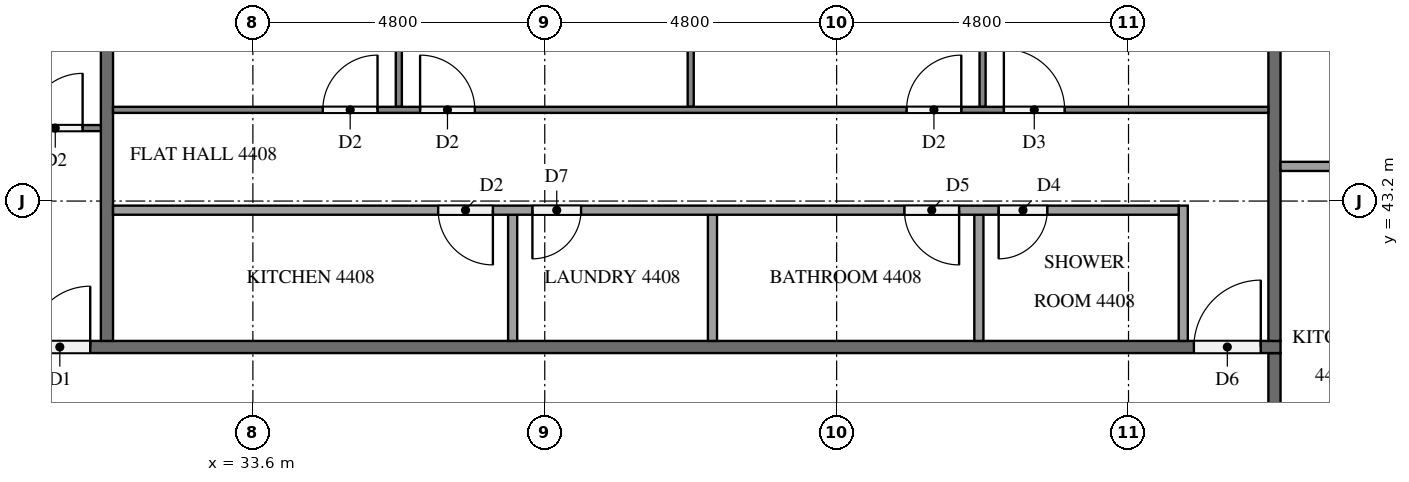
"""IFC4 building model, lengths in metres.
Left out: names, types, materials, properties, quantities, classifications, styles, units other than length and angle.
Written with IfcOpenShell. Run it as: python <this file> out.ifc"""

import sys

from ifc_helpers import new_model, si_unit, direction, frame, frame_2d, origin, place, context, subcontext, project, spatial, rectangle, extrude, element, fill, save


model = new_model("IFC4")
c1 = context("Model", 3, precision=1e-05, world=origin(), true_north=direction((0.0, 1.0)))
c2 = subcontext(c1, "Body", "Model", "MODEL_VIEW")
j1 = project(units=[si_unit("LENGTHUNIT", "METRE"), si_unit("PLANEANGLEUNIT", "RADIAN")], contexts=[c1])
p1 = place(None, origin())
s1 = spatial("IfcSite", under=j1, at=p1, CompositionType="ELEMENT")
p2 = place(p1, origin())
s2 = spatial("IfcBuilding", under=s1, at=p2, CompositionType="ELEMENT")
p3 = place(p2, frame((0.0, 0.0, 170.0)))
s3 = spatial("IfcBuildingStorey", under=s2, at=p3, CompositionType="ELEMENT", Elevation=170.0)
p4 = place(p3, frame((50.4, 40.7, 0.0), z_axis=(0.0, 0.0, 1.0), x_axis=(0.0, -1.0, 0.0)))
e1 = element("IfcWall", 1, at=p4, inside=s3, PredefinedType="PARTITIONING", context=c2, shape_type="SweptSolid", body=[
    extrude(rectangle(XDim=28.6, YDim=0.2, at=frame_2d((14.3, 0.0))), origin(), (0.0, 0.0, 1.0), 3.1),
])
p5 = place(p4, frame((26.575, 0.0, 0.0)))
e2 = element("IfcOpeningElement", 2, at=p5, cuts=e1, PredefinedType="OPENING", context=c2, shape_type="SweptSolid", body=[
    extrude(rectangle(XDim=1.0, YDim=2.1, at=frame_2d((0.5, 1.05))), frame((0.0, 0.11, 0.0), z_axis=(0.0, -1.0, 0.0), x_axis=(1.0, 0.0, 0.0)), (0.0, 0.0, 1.0), 0.22),
])
p6 = place(p4, frame((25.025, 0.0, 0.0)))
e3 = element("IfcOpeningElement", 3, at=p6, cuts=e1, PredefinedType="OPENING", context=c2, shape_type="SweptSolid", body=[
    extrude(rectangle(XDim=1.0, YDim=2.1, at=frame_2d((0.5, 1.05))), frame((0.0, 0.11, 0.0), z_axis=(0.0, -1.0, 0.0), x_axis=(1.0, 0.0, 0.0)), (0.0, 0.0, 1.0), 0.22),
])
p7 = place(p4, frame((4.975, 0.0, 0.0)))
e4 = element("IfcOpeningElement", 4, at=p7, cuts=e1, PredefinedType="OPENING", context=c2, shape_type="SweptSolid", body=[
    extrude(rectangle(XDim=1.0, YDim=2.1, at=frame_2d((0.5, 1.05))), frame((0.0, 0.11, 0.0), z_axis=(0.0, -1.0, 0.0), x_axis=(1.0, 0.0, 0.0)), (0.0, 0.0, 1.0), 0.22),
])
p8 = place(p4, frame((3.425, 0.0, 0.0)))
e5 = element("IfcOpeningElement", 5, at=p8, cuts=e1, PredefinedType="OPENING", context=c2, shape_type="SweptSolid", body=[
    extrude(rectangle(XDim=1.0, YDim=2.1, at=frame_2d((0.5, 1.05))), frame((0.0, 0.11, 0.0), z_axis=(0.0, -1.0, 0.0), x_axis=(1.0, 0.0, 0.0)), (0.0, 0.0, 1.0), 0.22),
])
p9 = place(p3, frame((11.9, 40.8, 0.0), z_axis=(0.0, 0.0, 1.0), x_axis=(1.0, 0.0, 0.0)))
e6 = element("IfcWall", 6, at=p9, inside=s3, PredefinedType="PARTITIONING", context=c2, shape_type="SweptSolid", body=[
    extrude(rectangle(XDim=38.6, YDim=0.2, at=frame_2d((19.3, 0.0))), origin(), (0.0, 0.0, 1.0), 3.1),
])
p10 = place(p9, frame((37.175, 0.0, 0.0)))
e7 = element("IfcOpeningElement", 7, at=p10, cuts=e6, PredefinedType="OPENING", context=c2, shape_type="SweptSolid", body=[
    extrude(rectangle(XDim=1.1, YDim=2.1, at=frame_2d((0.55, 1.05))), frame((0.0, 0.11, 0.0), z_axis=(0.0, -1.0, 0.0), x_axis=(1.0, 0.0, 0.0)), (0.0, 0.0, 1.0), 0.22),
])
p11 = place(p9, frame((18.025, 0.0, 0.0)))
e8 = element("IfcOpeningElement", 8, at=p11, cuts=e6, PredefinedType="OPENING", context=c2, shape_type="SweptSolid", body=[
    extrude(rectangle(XDim=1.0, YDim=2.1, at=frame_2d((0.5, 1.05))), frame((0.0, 0.11, 0.0), z_axis=(0.0, -1.0, 0.0), x_axis=(1.0, 0.0, 0.0)), (0.0, 0.0, 1.0), 0.22),
])
p12 = place(p9, frame((3.625, 0.0, 0.0)))
e9 = element("IfcOpeningElement", 9, at=p12, cuts=e6, PredefinedType="OPENING", context=c2, shape_type="SweptSolid", body=[
    extrude(rectangle(XDim=1.0, YDim=2.1, at=frame_2d((0.5, 1.05))), frame((0.0, 0.11, 0.0), z_axis=(0.0, -1.0, 0.0), x_axis=(1.0, 0.0, 0.0)), (0.0, 0.0, 1.0), 0.22),
])
for number, where, z_axis, x_axis in (
    (10, (50.4, 40.9, 0.0), (0.0, 0.0, 1.0), (0.0, 1.0, 0.0)),
    (11, (31.2, 47.9, 0.0), (0.0, 0.0, 1.0), (0.0, -1.0, 0.0)),
):
    element("IfcWall", number, at=place(p3, frame(where, z_axis=z_axis, x_axis=x_axis)), inside=s3, PredefinedType="PARTITIONING", context=c2, shape_type="SweptSolid", body=[
        extrude(rectangle(XDim=7.0, YDim=0.2, at=frame_2d((3.5, 0.0))), origin(), (0.0, 0.0, 1.0), 3.1),
    ])
p13 = place(p3, frame((50.5, 43.77, 0.0), z_axis=(0.0, 0.0, 1.0), x_axis=(1.0, 0.0, 0.0)))
e12 = element("IfcWall", 12, at=p13, inside=s3, PredefinedType="PARTITIONING", context=c2, shape_type="SweptSolid", body=[
    extrude(rectangle(XDim=1.775, YDim=0.15, at=frame_2d((0.887, 0.0))), origin(), (0.0, 0.0, 1.0), 3.1),
])
for number, where, z_axis, x_axis in (
    (13, (45.6, 44.75, 0.0), (0.0, 0.0, 1.0), (0.0, 1.0, 0.0)),
    (14, (40.8, 44.75, 0.0), (0.0, 0.0, 1.0), (0.0, 1.0, 0.0)),
    (15, (36.0, 44.75, 0.0), (0.0, 0.0, 1.0), (0.0, 1.0, 0.0)),
):
    element("IfcWall", number, at=place(p3, frame(where, z_axis=z_axis, x_axis=x_axis)), inside=s3, PredefinedType="PARTITIONING", context=c2, shape_type="SweptSolid", body=[
        extrude(rectangle(XDim=3.15, YDim=0.1, at=frame_2d((1.575, 0.0))), origin(), (0.0, 0.0, 1.0), 3.1),
    ])
p14 = place(p3, frame((31.3, 44.7, 0.0), z_axis=(0.0, 0.0, 1.0), x_axis=(1.0, 0.0, 0.0)))
e16 = element("IfcWall", 16, at=p14, inside=s3, PredefinedType="PARTITIONING", context=c2, shape_type="SweptSolid", body=[
    extrude(rectangle(XDim=19.0, YDim=0.1, at=frame_2d((9.5, 0.0))), origin(), (0.0, 0.0, 1.0), 3.1),
])
p15 = place(p14, frame((14.65, 0.0, 0.0)))
e17 = element("IfcOpeningElement", 17, at=p15, cuts=e16, PredefinedType="OPENING", context=c2, shape_type="SweptSolid", body=[
    extrude(rectangle(XDim=1.0, YDim=2.1, at=frame_2d((0.5, 1.05))), frame((0.0, 0.06, 0.0), z_axis=(0.0, -1.0, 0.0), x_axis=(1.0, 0.0, 0.0)), (0.0, 0.0, 1.0), 0.12),
])
p16 = place(p14, frame((13.05, 0.0, 0.0)))
e18 = element("IfcOpeningElement", 18, at=p16, cuts=e16, PredefinedType="OPENING", context=c2, shape_type="SweptSolid", body=[
    extrude(rectangle(XDim=0.9, YDim=2.1, at=frame_2d((0.45, 1.05))), frame((0.0, 0.06, 0.0), z_axis=(0.0, -1.0, 0.0), x_axis=(1.0, 0.0, 0.0)), (0.0, 0.0, 1.0), 0.12),
])
p17 = place(p14, frame((5.05, 0.0, 0.0)))
e19 = element("IfcOpeningElement", 19, at=p17, cuts=e16, PredefinedType="OPENING", context=c2, shape_type="SweptSolid", body=[
    extrude(rectangle(XDim=0.9, YDim=2.1, at=frame_2d((0.45, 1.05))), frame((0.0, 0.06, 0.0), z_axis=(0.0, -1.0, 0.0), x_axis=(1.0, 0.0, 0.0)), (0.0, 0.0, 1.0), 0.12),
])
p18 = place(p14, frame((3.45, 0.0, 0.0)))
e20 = element("IfcOpeningElement", 20, at=p18, cuts=e16, PredefinedType="OPENING", context=c2, shape_type="SweptSolid", body=[
    extrude(rectangle(XDim=0.9, YDim=2.1, at=frame_2d((0.45, 1.05))), frame((0.0, 0.06, 0.0), z_axis=(0.0, -1.0, 0.0), x_axis=(1.0, 0.0, 0.0)), (0.0, 0.0, 1.0), 0.12),
])
for number, where, z_axis, x_axis in (
    (21, (45.539, 40.9, 0.0), (0.0, 0.0, 1.0), (0.0, 1.0, 0.0)),
    (22, (41.158, 40.9, 0.0), (0.0, 0.0, 1.0), (0.0, 1.0, 0.0)),
    (23, (37.872, 40.9, 0.0), (0.0, 0.0, 1.0), (0.0, 1.0, 0.0)),
):
    element("IfcWall", number, at=place(p3, frame(where, z_axis=z_axis, x_axis=x_axis)), inside=s3, PredefinedType="PARTITIONING", context=c2, shape_type="SweptSolid", body=[
        extrude(rectangle(XDim=2.075, YDim=0.15, at=frame_2d((1.038, 0.0))), origin(), (0.0, 0.0, 1.0), 3.1),
    ])
p19 = place(p3, frame((48.9, 40.9, 0.0), z_axis=(0.0, 0.0, 1.0), x_axis=(0.0, 1.0, 0.0)))
e24 = element("IfcWall", 24, at=p19, inside=s3, PredefinedType="PARTITIONING", context=c2, shape_type="SweptSolid", body=[
    extrude(rectangle(XDim=2.225, YDim=0.15, at=frame_2d((1.113, 0.0))), origin(), (0.0, 0.0, 1.0), 3.1),
])
p20 = place(p3, frame((48.825, 43.05, 0.0), z_axis=(0.0, 0.0, 1.0), x_axis=(-1.0, 0.0, 0.0)))
e25 = element("IfcWall", 25, at=p20, inside=s3, PredefinedType="PARTITIONING", context=c2, shape_type="SweptSolid", body=[
    extrude(rectangle(XDim=17.525, YDim=0.15, at=frame_2d((8.762, 0.0))), origin(), (0.0, 0.0, 1.0), 3.1),
])
p21 = place(p20, frame((2.161, 0.0, 0.0)))
e26 = element("IfcOpeningElement", 26, at=p21, cuts=e25, PredefinedType="OPENING", context=c2, shape_type="SweptSolid", body=[
    extrude(rectangle(XDim=0.8, YDim=2.1, at=frame_2d((0.4, 1.05))), frame((0.0, 0.085, 0.0), z_axis=(0.0, -1.0, 0.0), x_axis=(1.0, 0.0, 0.0)), (0.0, 0.0, 1.0), 0.17),
])
p22 = place(p20, frame((3.611, 0.0, 0.0)))
e27 = element("IfcOpeningElement", 27, at=p22, cuts=e25, PredefinedType="OPENING", context=c2, shape_type="SweptSolid", body=[
    extrude(rectangle(XDim=0.9, YDim=2.1, at=frame_2d((0.45, 1.05))), frame((0.0, 0.085, 0.0), z_axis=(0.0, -1.0, 0.0), x_axis=(1.0, 0.0, 0.0)), (0.0, 0.0, 1.0), 0.17),
])
p23 = place(p20, frame((9.828, 0.0, 0.0)))
e28 = element("IfcOpeningElement", 28, at=p23, cuts=e25, PredefinedType="OPENING", context=c2, shape_type="SweptSolid", body=[
    extrude(rectangle(XDim=0.8, YDim=2.1, at=frame_2d((0.4, 1.05))), frame((0.0, 0.085, 0.0), z_axis=(0.0, -1.0, 0.0), x_axis=(1.0, 0.0, 0.0)), (0.0, 0.0, 1.0), 0.17),
])
p24 = place(p20, frame((11.278, 0.0, 0.0)))
e29 = element("IfcOpeningElement", 29, at=p24, cuts=e25, PredefinedType="OPENING", context=c2, shape_type="SweptSolid", body=[
    extrude(rectangle(XDim=0.9, YDim=2.1, at=frame_2d((0.45, 1.05))), frame((0.0, 0.085, 0.0), z_axis=(0.0, -1.0, 0.0), x_axis=(1.0, 0.0, 0.0)), (0.0, 0.0, 1.0), 0.17),
])
p25 = place(p3, frame((16.9, 44.4, 0.0), z_axis=(0.0, 0.0, 1.0), x_axis=(1.0, 0.0, 0.0)))
e30 = element("IfcWall", 30, at=p25, inside=s3, PredefinedType="PARTITIONING", context=c2, shape_type="SweptSolid", body=[
    extrude(rectangle(XDim=14.2, YDim=0.1, at=frame_2d((7.1, 0.0))), origin(), (0.0, 0.0, 1.0), 3.1),
])
p26 = place(p25, frame((13.0, 0.0, 0.0)))
e31 = element("IfcOpeningElement", 31, at=p26, cuts=e30, PredefinedType="OPENING", context=c2, shape_type="SweptSolid", body=[
    extrude(rectangle(XDim=0.9, YDim=2.1, at=frame_2d((0.45, 1.05))), frame((0.0, 0.06, 0.0), z_axis=(0.0, -1.0, 0.0), x_axis=(1.0, 0.0, 0.0)), (0.0, 0.0, 1.0), 0.12),
])
p27 = place(p25, frame((5.05, 0.0, 0.0)))
e32 = element("IfcOpeningElement", 32, at=p27, cuts=e30, PredefinedType="OPENING", context=c2, shape_type="SweptSolid", body=[
    extrude(rectangle(XDim=0.9, YDim=2.1, at=frame_2d((0.45, 1.05))), frame((0.0, 0.06, 0.0), z_axis=(0.0, -1.0, 0.0), x_axis=(1.0, 0.0, 0.0)), (0.0, 0.0, 1.0), 0.12),
])
p28 = place(p25, frame((3.35, 0.0, 0.0)))
e33 = element("IfcOpeningElement", 33, at=p28, cuts=e30, PredefinedType="OPENING", context=c2, shape_type="SweptSolid", body=[
    extrude(rectangle(XDim=1.0, YDim=2.1, at=frame_2d((0.5, 1.05))), frame((0.0, 0.06, 0.0), z_axis=(0.0, -1.0, 0.0), x_axis=(1.0, 0.0, 0.0)), (0.0, 0.0, 1.0), 0.12),
])
p29 = place(p10, origin())
e34 = element("IfcDoor", 34, at=p29, inside=s3, OperationType="SINGLE_SWING_RIGHT", PredefinedType="DOOR", context=c2, shape_type="SweptSolid", body=[
    extrude(rectangle(XDim=1.1, YDim=2.1, at=frame_2d((0.55, 1.05))), frame((0.0, 0.025, 0.0), z_axis=(0.0, -1.0, 0.0), x_axis=(1.0, 0.0, 0.0)), (0.0, 0.0, 1.0), 0.05),
])
fill(e7, e34)
p30 = place(p11, origin())
e35 = element("IfcDoor", 35, at=p30, inside=s3, OperationType="SINGLE_SWING_RIGHT", PredefinedType="DOOR", context=c2, shape_type="SweptSolid", body=[
    extrude(rectangle(XDim=1.0, YDim=2.1, at=frame_2d((0.5, 1.05))), frame((0.0, 0.025, 0.0), z_axis=(0.0, -1.0, 0.0), x_axis=(1.0, 0.0, 0.0)), (0.0, 0.0, 1.0), 0.05),
])
fill(e8, e35)
p31 = place(p15, origin())
e36 = element("IfcDoor", 36, at=p31, inside=s3, OperationType="SINGLE_SWING_LEFT", PredefinedType="DOOR", context=c2, shape_type="SweptSolid", body=[
    extrude(rectangle(XDim=1.0, YDim=2.1, at=frame_2d((0.5, 1.05))), frame((0.0, 0.025, 0.0), z_axis=(0.0, -1.0, 0.0), x_axis=(1.0, 0.0, 0.0)), (0.0, 0.0, 1.0), 0.05),
])
fill(e17, e36)
p32 = place(p16, origin())
e37 = element("IfcDoor", 37, at=p32, inside=s3, OperationType="SINGLE_SWING_RIGHT", PredefinedType="DOOR", context=c2, shape_type="SweptSolid", body=[
    extrude(rectangle(XDim=0.9, YDim=2.1, at=frame_2d((0.45, 1.05))), frame((0.0, 0.025, 0.0), z_axis=(0.0, -1.0, 0.0), x_axis=(1.0, 0.0, 0.0)), (0.0, 0.0, 1.0), 0.05),
])
fill(e18, e37)
p33 = place(p17, origin())
e38 = element("IfcDoor", 38, at=p33, inside=s3, OperationType="SINGLE_SWING_LEFT", PredefinedType="DOOR", context=c2, shape_type="SweptSolid", body=[
    extrude(rectangle(XDim=0.9, YDim=2.1, at=frame_2d((0.45, 1.05))), frame((0.0, 0.025, 0.0), z_axis=(0.0, -1.0, 0.0), x_axis=(1.0, 0.0, 0.0)), (0.0, 0.0, 1.0), 0.05),
])
fill(e19, e38)
p34 = place(p18, origin())
e39 = element("IfcDoor", 39, at=p34, inside=s3, OperationType="SINGLE_SWING_RIGHT", PredefinedType="DOOR", context=c2, shape_type="SweptSolid", body=[
    extrude(rectangle(XDim=0.9, YDim=2.1, at=frame_2d((0.45, 1.05))), frame((0.0, 0.025, 0.0), z_axis=(0.0, -1.0, 0.0), x_axis=(1.0, 0.0, 0.0)), (0.0, 0.0, 1.0), 0.05),
])
fill(e20, e39)
p35 = place(p21, origin())
e40 = element("IfcDoor", 40, at=p35, inside=s3, OperationType="SINGLE_SWING_RIGHT", PredefinedType="DOOR", context=c2, shape_type="SweptSolid", body=[
    extrude(rectangle(XDim=0.8, YDim=2.1, at=frame_2d((0.4, 1.05))), frame((0.0, 0.025, 0.0), z_axis=(0.0, -1.0, 0.0), x_axis=(1.0, 0.0, 0.0)), (0.0, 0.0, 1.0), 0.05),
])
fill(e26, e40)
p36 = place(p22, origin())
e41 = element("IfcDoor", 41, at=p36, inside=s3, OperationType="SINGLE_SWING_LEFT", PredefinedType="DOOR", context=c2, shape_type="SweptSolid", body=[
    extrude(rectangle(XDim=0.9, YDim=2.1, at=frame_2d((0.45, 1.05))), frame((0.0, 0.025, 0.0), z_axis=(0.0, -1.0, 0.0), x_axis=(1.0, 0.0, 0.0)), (0.0, 0.0, 1.0), 0.05),
])
fill(e27, e41)
p37 = place(p23, origin())
e42 = element("IfcDoor", 42, at=p37, inside=s3, OperationType="SINGLE_SWING_RIGHT", PredefinedType="DOOR", context=c2, shape_type="SweptSolid", body=[
    extrude(rectangle(XDim=0.8, YDim=2.1, at=frame_2d((0.4, 1.05))), frame((0.0, 0.025, 0.0), z_axis=(0.0, -1.0, 0.0), x_axis=(1.0, 0.0, 0.0)), (0.0, 0.0, 1.0), 0.05),
])
fill(e28, e42)
p38 = place(p24, origin())
e43 = element("IfcDoor", 43, at=p38, inside=s3, OperationType="SINGLE_SWING_LEFT", PredefinedType="DOOR", context=c2, shape_type="SweptSolid", body=[
    extrude(rectangle(XDim=0.9, YDim=2.1, at=frame_2d((0.45, 1.05))), frame((0.0, 0.025, 0.0), z_axis=(0.0, -1.0, 0.0), x_axis=(1.0, 0.0, 0.0)), (0.0, 0.0, 1.0), 0.05),
])
fill(e29, e43)
p39 = place(p26, origin())
e44 = element("IfcDoor", 44, at=p39, inside=s3, OperationType="SINGLE_SWING_RIGHT", PredefinedType="DOOR", context=c2, shape_type="SweptSolid", body=[
    extrude(rectangle(XDim=0.9, YDim=2.1, at=frame_2d((0.45, 1.05))), frame((0.0, 0.025, 0.0), z_axis=(0.0, -1.0, 0.0), x_axis=(1.0, 0.0, 0.0)), (0.0, 0.0, 1.0), 0.05),
])
fill(e31, e44)
save(model, sys.argv[1])
